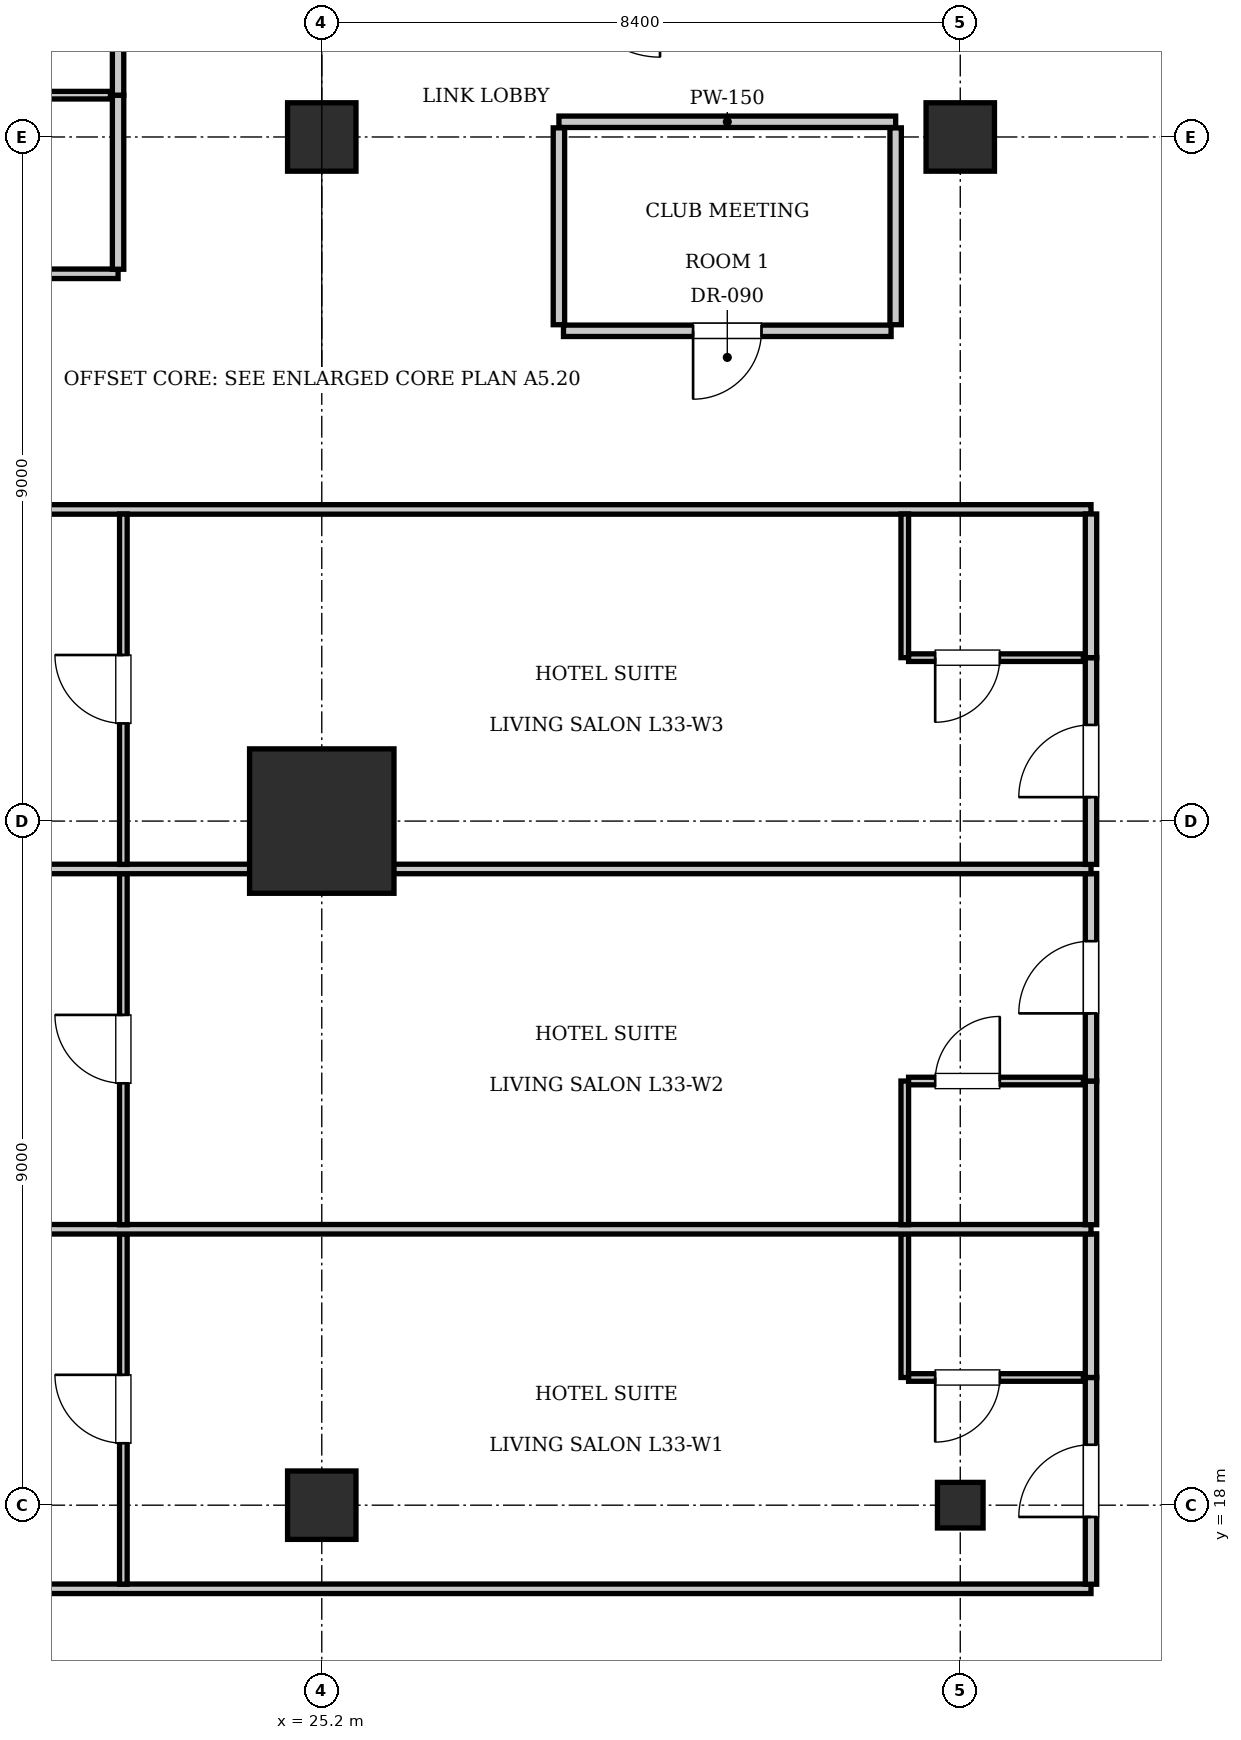
"""IFC4 building model, lengths in metres.
Left out: names, types, materials, properties, quantities, classifications, styles, units other than length and angle.
Written with IfcOpenShell. Run it as: python <this file> out.ifc"""

import sys

from ifc_helpers import new_model, si_unit, direction, frame, frame_2d, origin, origin_2d, place, context, subcontext, project, spatial, rectangle, i_section, extrude, element, fill, save


model = new_model("IFC4")
c1 = context("Model", 3, precision=1e-05, world=origin(), true_north=direction((0.0, 1.0)))
c2 = subcontext(c1, "Body", "Model", "MODEL_VIEW")
j1 = project(units=[si_unit("LENGTHUNIT", "METRE"), si_unit("PLANEANGLEUNIT", "RADIAN")], contexts=[c1])
p1 = place(None, origin())
s1 = spatial("IfcSite", under=j1, at=p1, CompositionType="ELEMENT")
p2 = place(p1, origin())
s2 = spatial("IfcBuilding", under=s1, at=p2, CompositionType="ELEMENT")
p3 = place(p2, frame((0.0, 0.0, 138.95)))
s3 = spatial("IfcBuildingStorey", under=s2, at=p3, CompositionType="ELEMENT", Elevation=138.95)
p4 = place(p3, frame((25.2, 27.0, 0.0), z_axis=(0.0, 0.0, 1.0), x_axis=(1.0, 0.0, 0.0)))
e1 = element("IfcColumn", 1, at=p4, inside=s3, PredefinedType="COLUMN", context=c2, shape_type="SweptSolid", body=[
    extrude(rectangle(XDim=1.9, YDim=1.9, at=origin_2d()), origin(), (0.0, 0.0, 1.0), 3.85),
])
for number, where, z_axis, x_axis in (
    (2, (25.2, 36.0, 0.0), (0.0, 0.0, 1.0), (1.0, 0.0, 0.0)),
    (3, (33.6, 36.0, 0.0), (0.0, 0.0, 1.0), (1.0, 0.0, 0.0)),
    (4, (25.2, 18.0, 0.0), (0.0, 0.0, 1.0), (1.0, 0.0, 0.0)),
):
    element("IfcColumn", number, at=place(p3, frame(where, z_axis=z_axis, x_axis=x_axis)), inside=s3, PredefinedType="COLUMN", context=c2, shape_type="SweptSolid", body=[
        extrude(rectangle(XDim=0.9, YDim=0.9, at=origin_2d()), origin(), (0.0, 0.0, 1.0), 3.85),
    ])
p5 = place(p3, frame((33.6, 18.0, 0.0), z_axis=(0.0, 0.0, 1.0), x_axis=(1.0, 0.0, 0.0)))
e5 = element("IfcColumn", 5, at=p5, inside=s3, PredefinedType="COLUMN", context=c2, shape_type="SweptSolid", body=[
    extrude(i_section(OverallWidth=0.6, OverallDepth=0.6, WebThickness=0.025, FlangeThickness=0.038, at=origin_2d()), origin(), (0.0, 0.0, 1.0), 3.85),
])
p6 = place(p3, frame((28.32, 36.2, 0.0), z_axis=(0.0, 0.0, 1.0), x_axis=(1.0, 0.0, 0.0)))
e6 = element("IfcWall", 6, at=p6, inside=s3, PredefinedType="PARTITIONING", context=c2, shape_type="SweptSolid", body=[
    extrude(rectangle(XDim=4.43, YDim=0.15, at=frame_2d((2.215, 0.0))), origin(), (0.0, 0.0, 1.0), 3.61),
])
for number, where, z_axis, x_axis in (
    (7, (28.32, 33.53, 0.0), (0.0, 0.0, 1.0), (0.0, 1.0, 0.0)),
    (8, (32.75, 33.53, 0.0), (0.0, 0.0, 1.0), (0.0, 1.0, 0.0)),
):
    element("IfcWall", number, at=place(p3, frame(where, z_axis=z_axis, x_axis=x_axis)), inside=s3, PredefinedType="PARTITIONING", context=c2, shape_type="SweptSolid", body=[
        extrude(rectangle(XDim=2.59, YDim=0.15, at=frame_2d((1.295, 0.0))), origin(), (0.0, 0.0, 1.0), 3.61),
    ])
p7 = place(p3, frame((28.38, 33.45, 0.0), z_axis=(0.0, 0.0, 1.0), x_axis=(1.0, 0.0, 0.0)))
e9 = element("IfcWall", 9, at=p7, inside=s3, PredefinedType="PARTITIONING", context=c2, shape_type="SweptSolid", body=[
    extrude(rectangle(XDim=4.31, YDim=0.15, at=frame_2d((2.155, 0.0))), origin(), (0.0, 0.0, 1.0), 3.61),
])
p8 = place(p7, frame((1.705, 0.0, 0.0)))
e10 = element("IfcOpeningElement", 10, at=p8, cuts=e9, PredefinedType="OPENING", context=c2, shape_type="SweptSolid", body=[
    extrude(rectangle(XDim=0.9, YDim=2.1, at=frame_2d((0.45, 1.05))), frame((0.0, 0.085, 0.0), z_axis=(0.0, -1.0, 0.0), x_axis=(1.0, 0.0, 0.0)), (0.0, 0.0, 1.0), 0.17),
])
for number, where, z_axis, x_axis in (
    (11, (13.2, 16.9, 0.0), (0.0, 0.0, 1.0), (1.0, 0.0, 0.0)),
    (12, (13.2, 31.1, 0.0), (0.0, 0.0, 1.0), (1.0, 0.0, 0.0)),
):
    element("IfcWall", number, at=place(p3, frame(where, z_axis=z_axis, x_axis=x_axis)), inside=s3, PredefinedType="PARTITIONING", context=c2, shape_type="SweptSolid", body=[
        extrude(rectangle(XDim=22.12, YDim=0.125, at=frame_2d((11.06, 0.0))), origin(), (0.0, 0.0, 1.0), 3.61),
    ])
p9 = place(p3, frame((35.32, 16.96, 0.0), z_axis=(0.0, 0.0, 1.0), x_axis=(0.0, 1.0, 0.0)))
e13 = element("IfcWall", 13, at=p9, inside=s3, PredefinedType="PARTITIONING", context=c2, shape_type="SweptSolid", body=[
    extrude(rectangle(XDim=2.72, YDim=0.15, at=frame_2d((1.36, 0.0))), origin(), (0.0, 0.0, 1.0), 3.61),
])
p10 = place(p9, frame((0.885, 0.0, 0.0)))
e14 = element("IfcOpeningElement", 14, at=p10, cuts=e13, PredefinedType="OPENING", context=c2, shape_type="SweptSolid", body=[
    extrude(rectangle(XDim=0.95, YDim=2.15, at=frame_2d((0.475, 1.075))), frame((0.0, 0.085, 0.0), z_axis=(0.0, -1.0, 0.0), x_axis=(1.0, 0.0, 0.0)), (0.0, 0.0, 1.0), 0.17),
])
p11 = place(p3, frame((35.32, 19.68, 0.0), z_axis=(0.0, 0.0, 1.0), x_axis=(0.0, 1.0, 0.0)))
e15 = element("IfcWall", 15, at=p11, inside=s3, PredefinedType="PARTITIONING", context=c2, shape_type="SweptSolid", body=[
    extrude(rectangle(XDim=1.89, YDim=0.15, at=frame_2d((0.945, 0.0))), origin(), (0.0, 0.0, 1.0), 3.61),
])
p12 = place(p3, frame((32.87, 19.68, 0.0), z_axis=(0.0, 0.0, 1.0), x_axis=(0.0, 1.0, 0.0)))
e16 = element("IfcWall", 16, at=p12, inside=s3, PredefinedType="PARTITIONING", context=c2, shape_type="SweptSolid", body=[
    extrude(rectangle(XDim=1.89, YDim=0.1, at=frame_2d((0.945, 0.0))), origin(), (0.0, 0.0, 1.0), 3.61),
])
p13 = place(p3, frame((32.92, 19.68, 0.0), z_axis=(0.0, 0.0, 1.0), x_axis=(1.0, 0.0, 0.0)))
e17 = element("IfcWall", 17, at=p13, inside=s3, PredefinedType="PARTITIONING", context=c2, shape_type="SweptSolid", body=[
    extrude(rectangle(XDim=2.3, YDim=0.1, at=frame_2d((1.15, 0.0))), origin(), (0.0, 0.0, 1.0), 3.61),
])
p14 = place(p13, frame((0.35, 0.0, 0.0)))
e18 = element("IfcOpeningElement", 18, at=p14, cuts=e17, PredefinedType="OPENING", context=c2, shape_type="SweptSolid", body=[
    extrude(rectangle(XDim=0.85, YDim=2.1, at=frame_2d((0.425, 1.05))), frame((0.0, 0.06, 0.0), z_axis=(0.0, -1.0, 0.0), x_axis=(1.0, 0.0, 0.0)), (0.0, 0.0, 1.0), 0.12),
])
p15 = place(p3, frame((22.59, 16.96, 0.0), z_axis=(0.0, 0.0, 1.0), x_axis=(0.0, 1.0, 0.0)))
e19 = element("IfcWall", 19, at=p15, inside=s3, PredefinedType="PARTITIONING", context=c2, shape_type="SweptSolid", body=[
    extrude(rectangle(XDim=4.61, YDim=0.1, at=frame_2d((2.305, 0.0))), origin(), (0.0, 0.0, 1.0), 3.61),
])
p16 = place(p15, frame((1.855, 0.0, 0.0)))
e20 = element("IfcOpeningElement", 20, at=p16, cuts=e19, PredefinedType="OPENING", context=c2, shape_type="SweptSolid", body=[
    extrude(rectangle(XDim=0.9, YDim=2.1, at=frame_2d((0.45, 1.05))), frame((0.0, 0.06, 0.0), z_axis=(0.0, -1.0, 0.0), x_axis=(1.0, 0.0, 0.0)), (0.0, 0.0, 1.0), 0.12),
])
p17 = place(p3, frame((13.2, 21.63, 0.0), z_axis=(0.0, 0.0, 1.0), x_axis=(1.0, 0.0, 0.0)))
e21 = element("IfcWall", 21, at=p17, inside=s3, PredefinedType="PARTITIONING", context=c2, shape_type="SweptSolid", body=[
    extrude(rectangle(XDim=22.12, YDim=0.125, at=frame_2d((11.06, 0.0))), origin(), (0.0, 0.0, 1.0), 3.61),
])
p18 = place(p3, frame((35.32, 21.69, 0.0), z_axis=(0.0, 0.0, 1.0), x_axis=(0.0, 1.0, 0.0)))
e22 = element("IfcWall", 22, at=p18, inside=s3, PredefinedType="PARTITIONING", context=c2, shape_type="SweptSolid", body=[
    extrude(rectangle(XDim=1.89, YDim=0.15, at=frame_2d((0.945, 0.0))), origin(), (0.0, 0.0, 1.0), 3.61),
])
p19 = place(p3, frame((35.32, 23.58, 0.0), z_axis=(0.0, 0.0, 1.0), x_axis=(0.0, 1.0, 0.0)))
e23 = element("IfcWall", 23, at=p19, inside=s3, PredefinedType="PARTITIONING", context=c2, shape_type="SweptSolid", body=[
    extrude(rectangle(XDim=2.73, YDim=0.15, at=frame_2d((1.365, 0.0))), origin(), (0.0, 0.0, 1.0), 3.61),
])
p20 = place(p19, frame((0.89, 0.0, 0.0)))
e24 = element("IfcOpeningElement", 24, at=p20, cuts=e23, PredefinedType="OPENING", context=c2, shape_type="SweptSolid", body=[
    extrude(rectangle(XDim=0.95, YDim=2.15, at=frame_2d((0.475, 1.075))), frame((0.0, 0.085, 0.0), z_axis=(0.0, -1.0, 0.0), x_axis=(1.0, 0.0, 0.0)), (0.0, 0.0, 1.0), 0.17),
])
p21 = place(p3, frame((32.87, 21.69, 0.0), z_axis=(0.0, 0.0, 1.0), x_axis=(0.0, 1.0, 0.0)))
e25 = element("IfcWall", 25, at=p21, inside=s3, PredefinedType="PARTITIONING", context=c2, shape_type="SweptSolid", body=[
    extrude(rectangle(XDim=1.89, YDim=0.1, at=frame_2d((0.945, 0.0))), origin(), (0.0, 0.0, 1.0), 3.61),
])
p22 = place(p3, frame((32.92, 23.58, 0.0), z_axis=(0.0, 0.0, 1.0), x_axis=(1.0, 0.0, 0.0)))
e26 = element("IfcWall", 26, at=p22, inside=s3, PredefinedType="PARTITIONING", context=c2, shape_type="SweptSolid", body=[
    extrude(rectangle(XDim=2.3, YDim=0.1, at=frame_2d((1.15, 0.0))), origin(), (0.0, 0.0, 1.0), 3.61),
])
p23 = place(p22, frame((0.35, 0.0, 0.0)))
e27 = element("IfcOpeningElement", 27, at=p23, cuts=e26, PredefinedType="OPENING", context=c2, shape_type="SweptSolid", body=[
    extrude(rectangle(XDim=0.85, YDim=2.1, at=frame_2d((0.425, 1.05))), frame((0.0, 0.06, 0.0), z_axis=(0.0, -1.0, 0.0), x_axis=(1.0, 0.0, 0.0)), (0.0, 0.0, 1.0), 0.12),
])
p24 = place(p3, frame((22.59, 21.69, 0.0), z_axis=(0.0, 0.0, 1.0), x_axis=(0.0, 1.0, 0.0)))
e28 = element("IfcWall", 28, at=p24, inside=s3, PredefinedType="PARTITIONING", context=c2, shape_type="SweptSolid", body=[
    extrude(rectangle(XDim=4.62, YDim=0.1, at=frame_2d((2.31, 0.0))), origin(), (0.0, 0.0, 1.0), 3.61),
])
p25 = place(p24, frame((1.86, 0.0, 0.0)))
e29 = element("IfcOpeningElement", 29, at=p25, cuts=e28, PredefinedType="OPENING", context=c2, shape_type="SweptSolid", body=[
    extrude(rectangle(XDim=0.9, YDim=2.1, at=frame_2d((0.45, 1.05))), frame((0.0, 0.06, 0.0), z_axis=(0.0, -1.0, 0.0), x_axis=(1.0, 0.0, 0.0)), (0.0, 0.0, 1.0), 0.12),
])
p26 = place(p3, frame((13.2, 26.37, 0.0), z_axis=(0.0, 0.0, 1.0), x_axis=(1.0, 0.0, 0.0)))
e30 = element("IfcWall", 30, at=p26, inside=s3, PredefinedType="PARTITIONING", context=c2, shape_type="SweptSolid", body=[
    extrude(rectangle(XDim=22.12, YDim=0.125, at=frame_2d((11.06, 0.0))), origin(), (0.0, 0.0, 1.0), 3.61),
])
p27 = place(p3, frame((35.32, 26.43, 0.0), z_axis=(0.0, 0.0, 1.0), x_axis=(0.0, 1.0, 0.0)))
e31 = element("IfcWall", 31, at=p27, inside=s3, PredefinedType="PARTITIONING", context=c2, shape_type="SweptSolid", body=[
    extrude(rectangle(XDim=2.72, YDim=0.15, at=frame_2d((1.36, 0.0))), origin(), (0.0, 0.0, 1.0), 3.61),
])
p28 = place(p27, frame((0.885, 0.0, 0.0)))
e32 = element("IfcOpeningElement", 32, at=p28, cuts=e31, PredefinedType="OPENING", context=c2, shape_type="SweptSolid", body=[
    extrude(rectangle(XDim=0.95, YDim=2.15, at=frame_2d((0.475, 1.075))), frame((0.0, 0.085, 0.0), z_axis=(0.0, -1.0, 0.0), x_axis=(1.0, 0.0, 0.0)), (0.0, 0.0, 1.0), 0.17),
])
p29 = place(p3, frame((35.32, 29.15, 0.0), z_axis=(0.0, 0.0, 1.0), x_axis=(0.0, 1.0, 0.0)))
e33 = element("IfcWall", 33, at=p29, inside=s3, PredefinedType="PARTITIONING", context=c2, shape_type="SweptSolid", body=[
    extrude(rectangle(XDim=1.89, YDim=0.15, at=frame_2d((0.945, 0.0))), origin(), (0.0, 0.0, 1.0), 3.61),
])
p30 = place(p3, frame((32.87, 29.15, 0.0), z_axis=(0.0, 0.0, 1.0), x_axis=(0.0, 1.0, 0.0)))
e34 = element("IfcWall", 34, at=p30, inside=s3, PredefinedType="PARTITIONING", context=c2, shape_type="SweptSolid", body=[
    extrude(rectangle(XDim=1.89, YDim=0.1, at=frame_2d((0.945, 0.0))), origin(), (0.0, 0.0, 1.0), 3.61),
])
p31 = place(p3, frame((32.92, 29.15, 0.0), z_axis=(0.0, 0.0, 1.0), x_axis=(1.0, 0.0, 0.0)))
e35 = element("IfcWall", 35, at=p31, inside=s3, PredefinedType="PARTITIONING", context=c2, shape_type="SweptSolid", body=[
    extrude(rectangle(XDim=2.3, YDim=0.1, at=frame_2d((1.15, 0.0))), origin(), (0.0, 0.0, 1.0), 3.61),
])
p32 = place(p31, frame((0.35, 0.0, 0.0)))
e36 = element("IfcOpeningElement", 36, at=p32, cuts=e35, PredefinedType="OPENING", context=c2, shape_type="SweptSolid", body=[
    extrude(rectangle(XDim=0.85, YDim=2.1, at=frame_2d((0.425, 1.05))), frame((0.0, 0.06, 0.0), z_axis=(0.0, -1.0, 0.0), x_axis=(1.0, 0.0, 0.0)), (0.0, 0.0, 1.0), 0.12),
])
p33 = place(p3, frame((22.59, 26.43, 0.0), z_axis=(0.0, 0.0, 1.0), x_axis=(0.0, 1.0, 0.0)))
e37 = element("IfcWall", 37, at=p33, inside=s3, PredefinedType="PARTITIONING", context=c2, shape_type="SweptSolid", body=[
    extrude(rectangle(XDim=4.61, YDim=0.1, at=frame_2d((2.305, 0.0))), origin(), (0.0, 0.0, 1.0), 3.61),
])
p34 = place(p33, frame((1.855, 0.0, 0.0)))
e38 = element("IfcOpeningElement", 38, at=p34, cuts=e37, PredefinedType="OPENING", context=c2, shape_type="SweptSolid", body=[
    extrude(rectangle(XDim=0.9, YDim=2.1, at=frame_2d((0.45, 1.05))), frame((0.0, 0.06, 0.0), z_axis=(0.0, -1.0, 0.0), x_axis=(1.0, 0.0, 0.0)), (0.0, 0.0, 1.0), 0.12),
])
p35 = place(p3, frame((13.2, 34.2, 0.0), z_axis=(0.0, 0.0, 1.0), x_axis=(1.0, 0.0, 0.0)))
e39 = element("IfcWall", 39, at=p35, inside=s3, PredefinedType="PARTITIONING", context=c2, shape_type="SweptSolid", body=[
    extrude(rectangle(XDim=9.32, YDim=0.125, at=frame_2d((4.66, 0.0))), origin(), (0.0, 0.0, 1.0), 3.61),
])
p36 = place(p3, frame((22.52, 34.26, 0.0), z_axis=(0.0, 0.0, 1.0), x_axis=(0.0, 1.0, 0.0)))
e40 = element("IfcWall", 40, at=p36, inside=s3, PredefinedType="PARTITIONING", context=c2, shape_type="SweptSolid", body=[
    extrude(rectangle(XDim=2.29, YDim=0.15, at=frame_2d((1.145, 0.0))), origin(), (0.0, 0.0, 1.0), 3.61),
])
p37 = place(p3, frame((22.52, 36.55, 0.0), z_axis=(0.0, 0.0, 1.0), x_axis=(0.0, 1.0, 0.0)))
e41 = element("IfcWall", 41, at=p37, inside=s3, PredefinedType="PARTITIONING", context=c2, shape_type="SweptSolid", body=[
    extrude(rectangle(XDim=5.259, YDim=0.15, at=frame_2d((2.629, 0.0))), origin(), (0.0, 0.0, 1.0), 3.61),
])
p38 = place(p37, frame((2.154, 0.0, 0.0)))
e42 = element("IfcOpeningElement", 42, at=p38, cuts=e41, PredefinedType="OPENING", context=c2, shape_type="SweptSolid", body=[
    extrude(rectangle(XDim=0.95, YDim=2.15, at=frame_2d((0.475, 1.075))), frame((0.0, 0.085, 0.0), z_axis=(0.0, -1.0, 0.0), x_axis=(1.0, 0.0, 0.0)), (0.0, 0.0, 1.0), 0.17),
])
p39 = place(p3, frame((20.12, 36.55, 0.0), z_axis=(0.0, 0.0, 1.0), x_axis=(1.0, 0.0, 0.0)))
e43 = element("IfcWall", 43, at=p39, inside=s3, PredefinedType="PARTITIONING", context=c2, shape_type="SweptSolid", body=[
    extrude(rectangle(XDim=2.3, YDim=0.1, at=frame_2d((1.15, 0.0))), origin(), (0.0, 0.0, 1.0), 3.61),
])
p40 = place(p39, frame((0.35, 0.0, 0.0)))
e44 = element("IfcOpeningElement", 44, at=p40, cuts=e43, PredefinedType="OPENING", context=c2, shape_type="SweptSolid", body=[
    extrude(rectangle(XDim=0.85, YDim=2.1, at=frame_2d((0.425, 1.05))), frame((0.0, 0.06, 0.0), z_axis=(0.0, -1.0, 0.0), x_axis=(1.0, 0.0, 0.0)), (0.0, 0.0, 1.0), 0.12),
])
p41 = place(p8, frame((0.9, 0.0, 0.0), z_axis=(0.0, 0.0, 1.0), x_axis=(-1.0, 0.0, 0.0)))
e45 = element("IfcDoor", 45, at=p41, inside=s3, OperationType="SINGLE_SWING_RIGHT", PredefinedType="DOOR", context=c2, shape_type="SweptSolid", body=[
    extrude(rectangle(XDim=0.9, YDim=2.1, at=frame_2d((0.45, 1.05))), frame((0.0, 0.025, 0.0), z_axis=(0.0, -1.0, 0.0), x_axis=(1.0, 0.0, 0.0)), (0.0, 0.0, 1.0), 0.05),
])
fill(e10, e45)
p42 = place(p14, frame((0.85, 0.0, 0.0), z_axis=(0.0, 0.0, 1.0), x_axis=(-1.0, 0.0, 0.0)))
e46 = element("IfcDoor", 46, at=p42, inside=s3, OperationType="SINGLE_SWING_RIGHT", PredefinedType="DOOR", context=c2, shape_type="SweptSolid", body=[
    extrude(rectangle(XDim=0.85, YDim=2.1, at=frame_2d((0.425, 1.05))), frame((0.0, 0.025, 0.0), z_axis=(0.0, -1.0, 0.0), x_axis=(1.0, 0.0, 0.0)), (0.0, 0.0, 1.0), 0.05),
])
fill(e18, e46)
p43 = place(p10, origin())
e47 = element("IfcDoor", 47, at=p43, inside=s3, OperationType="SINGLE_SWING_LEFT", PredefinedType="DOOR", context=c2, shape_type="SweptSolid", body=[
    extrude(rectangle(XDim=0.95, YDim=2.15, at=frame_2d((0.475, 1.075))), frame((0.0, 0.025, 0.0), z_axis=(0.0, -1.0, 0.0), x_axis=(1.0, 0.0, 0.0)), (0.0, 0.0, 1.0), 0.05),
])
fill(e14, e47)
p44 = place(p16, origin())
e48 = element("IfcDoor", 48, at=p44, inside=s3, OperationType="SINGLE_SWING_RIGHT", PredefinedType="DOOR", context=c2, shape_type="SweptSolid", body=[
    extrude(rectangle(XDim=0.9, YDim=2.1, at=frame_2d((0.45, 1.05))), frame((0.0, 0.025, 0.0), z_axis=(0.0, -1.0, 0.0), x_axis=(1.0, 0.0, 0.0)), (0.0, 0.0, 1.0), 0.05),
])
fill(e20, e48)
p45 = place(p23, origin())
e49 = element("IfcDoor", 49, at=p45, inside=s3, OperationType="SINGLE_SWING_RIGHT", PredefinedType="DOOR", context=c2, shape_type="SweptSolid", body=[
    extrude(rectangle(XDim=0.85, YDim=2.1, at=frame_2d((0.425, 1.05))), frame((0.0, 0.025, 0.0), z_axis=(0.0, -1.0, 0.0), x_axis=(1.0, 0.0, 0.0)), (0.0, 0.0, 1.0), 0.05),
])
fill(e27, e49)
p46 = place(p20, origin())
e50 = element("IfcDoor", 50, at=p46, inside=s3, OperationType="SINGLE_SWING_LEFT", PredefinedType="DOOR", context=c2, shape_type="SweptSolid", body=[
    extrude(rectangle(XDim=0.95, YDim=2.15, at=frame_2d((0.475, 1.075))), frame((0.0, 0.025, 0.0), z_axis=(0.0, -1.0, 0.0), x_axis=(1.0, 0.0, 0.0)), (0.0, 0.0, 1.0), 0.05),
])
fill(e24, e50)
p47 = place(p25, origin())
e51 = element("IfcDoor", 51, at=p47, inside=s3, OperationType="SINGLE_SWING_RIGHT", PredefinedType="DOOR", context=c2, shape_type="SweptSolid", body=[
    extrude(rectangle(XDim=0.9, YDim=2.1, at=frame_2d((0.45, 1.05))), frame((0.0, 0.025, 0.0), z_axis=(0.0, -1.0, 0.0), x_axis=(1.0, 0.0, 0.0)), (0.0, 0.0, 1.0), 0.05),
])
fill(e29, e51)
p48 = place(p32, frame((0.85, 0.0, 0.0), z_axis=(0.0, 0.0, 1.0), x_axis=(-1.0, 0.0, 0.0)))
e52 = element("IfcDoor", 52, at=p48, inside=s3, OperationType="SINGLE_SWING_RIGHT", PredefinedType="DOOR", context=c2, shape_type="SweptSolid", body=[
    extrude(rectangle(XDim=0.85, YDim=2.1, at=frame_2d((0.425, 1.05))), frame((0.0, 0.025, 0.0), z_axis=(0.0, -1.0, 0.0), x_axis=(1.0, 0.0, 0.0)), (0.0, 0.0, 1.0), 0.05),
])
fill(e36, e52)
p49 = place(p28, origin())
e53 = element("IfcDoor", 53, at=p49, inside=s3, OperationType="SINGLE_SWING_LEFT", PredefinedType="DOOR", context=c2, shape_type="SweptSolid", body=[
    extrude(rectangle(XDim=0.95, YDim=2.15, at=frame_2d((0.475, 1.075))), frame((0.0, 0.025, 0.0), z_axis=(0.0, -1.0, 0.0), x_axis=(1.0, 0.0, 0.0)), (0.0, 0.0, 1.0), 0.05),
])
fill(e32, e53)
p50 = place(p34, origin())
e54 = element("IfcDoor", 54, at=p50, inside=s3, OperationType="SINGLE_SWING_RIGHT", PredefinedType="DOOR", context=c2, shape_type="SweptSolid", body=[
    extrude(rectangle(XDim=0.9, YDim=2.1, at=frame_2d((0.45, 1.05))), frame((0.0, 0.025, 0.0), z_axis=(0.0, -1.0, 0.0), x_axis=(1.0, 0.0, 0.0)), (0.0, 0.0, 1.0), 0.05),
])
fill(e38, e54)
save(model, sys.argv[1])
